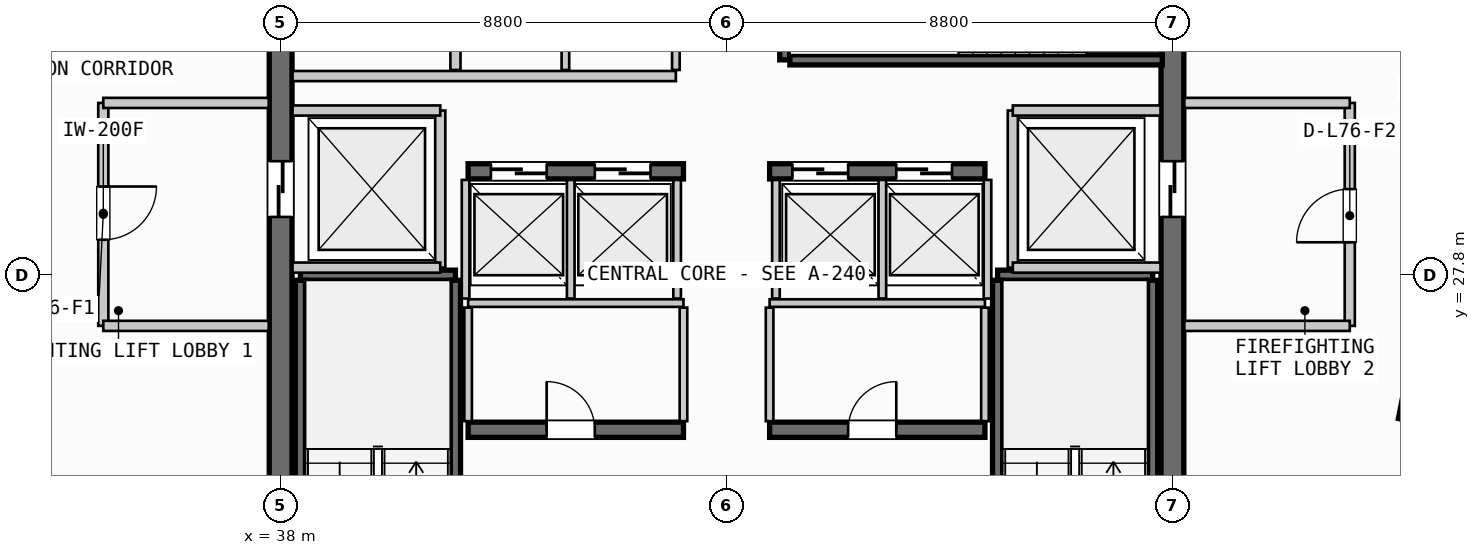
"""IFC4 building model, lengths in metres.
Left out: names, types, materials, properties, quantities, classifications, styles, units other than length and angle.
Written with IfcOpenShell. Run it as: python <this file> out.ifc"""

import sys

from ifc_helpers import new_model, si_unit, direction, frame, frame_2d, origin, origin_2d, place, context, subcontext, project, spatial, rectangle, i_section, extrude, source, transform, mapped, element, fill, save


model = new_model("IFC4")
c1 = context("Model", 3, precision=1e-05, world=origin(), true_north=direction((0.0, 1.0)))
c2 = subcontext(c1, "Body", "Model", "MODEL_VIEW")
j1 = project(units=[si_unit("LENGTHUNIT", "METRE"), si_unit("PLANEANGLEUNIT", "RADIAN")], contexts=[c1])
p1 = place(None, origin())
s1 = spatial("IfcSite", under=j1, at=p1, CompositionType="ELEMENT")
p2 = place(p1, origin())
s2 = spatial("IfcBuilding", under=s1, at=p2, CompositionType="ELEMENT")
p3 = place(p2, frame((0.0, 0.0, 287.05)))
s3 = spatial("IfcBuildingStorey", under=s2, at=p3, CompositionType="ELEMENT", Elevation=287.05)
p4 = place(p3, frame((38.0, 35.26, 0.0), z_axis=(0.0, 0.0, 1.0), x_axis=(0.0, -1.0, 0.0)))
e1 = element("IfcWall", 1, at=p4, inside=s3, PredefinedType="SHEAR", context=c2, shape_type="SweptSolid", body=[
    extrude(rectangle(XDim=14.92, YDim=0.45, at=frame_2d((7.46, 0.0))), origin(), (0.0, 0.0, 1.0), 3.21),
])
p5 = place(p4, frame((5.21, 0.0, 0.0)))
e2 = element("IfcOpeningElement", 2, at=p5, cuts=e1, PredefinedType="OPENING", context=c2, shape_type="SweptSolid", body=[
    extrude(rectangle(XDim=1.1, YDim=2.2, at=frame_2d((0.55, 1.1))), frame((0.0, 0.235, 0.0), z_axis=(0.0, -1.0, 0.0), x_axis=(1.0, 0.0, 0.0)), (0.0, 0.0, 1.0), 0.47),
])
p6 = place(p3, frame((55.6, 20.34, 0.0), z_axis=(0.0, 0.0, 1.0), x_axis=(0.0, 1.0, 0.0)))
e3 = element("IfcWall", 3, at=p6, inside=s3, PredefinedType="SHEAR", context=c2, shape_type="SweptSolid", body=[
    extrude(rectangle(XDim=14.92, YDim=0.45, at=frame_2d((7.46, 0.0))), origin(), (0.0, 0.0, 1.0), 3.21),
])
p7 = place(p6, frame((12.71, 0.0, 0.0)))
e4 = element("IfcOpeningElement", 4, at=p7, cuts=e3, PredefinedType="OPENING", context=c2, shape_type="SweptSolid", body=[
    extrude(rectangle(XDim=1.05, YDim=2.15, at=frame_2d((0.525, 1.075))), frame((0.0, 0.235, 0.0), z_axis=(0.0, -1.0, 0.0), x_axis=(1.0, 0.0, 0.0)), (0.0, 0.0, 1.0), 0.47),
])
p8 = place(p6, frame((8.61, 0.0, 0.0)))
e5 = element("IfcOpeningElement", 5, at=p8, cuts=e3, PredefinedType="OPENING", context=c2, shape_type="SweptSolid", body=[
    extrude(rectangle(XDim=1.1, YDim=2.2, at=frame_2d((0.55, 1.1))), frame((0.0, 0.235, 0.0), z_axis=(0.0, -1.0, 0.0), x_axis=(1.0, 0.0, 0.0)), (0.0, 0.0, 1.0), 0.47),
])
p9 = place(p3, frame((41.7, 24.75, 0.0), z_axis=(0.0, 0.0, 1.0), x_axis=(1.0, 0.0, 0.0)))
e6 = element("IfcWall", 6, at=p9, inside=s3, PredefinedType="SHEAR", context=c2, shape_type="SweptSolid", body=[
    extrude(rectangle(XDim=4.25, YDim=0.3, at=frame_2d((2.125, 0.0))), origin(), (0.0, 0.0, 1.0), 3.21),
])
p10 = place(p9, frame((1.55, 0.0, 0.0)))
e7 = element("IfcOpeningElement", 7, at=p10, cuts=e6, PredefinedType="OPENING", context=c2, shape_type="SweptSolid", body=[
    extrude(rectangle(XDim=0.95, YDim=2.15, at=frame_2d((0.475, 1.075))), frame((0.0, 0.16, 0.0), z_axis=(0.0, -1.0, 0.0), x_axis=(1.0, 0.0, 0.0)), (0.0, 0.0, 1.0), 0.32),
])
p11 = place(p3, frame((47.65, 24.75, 0.0), z_axis=(0.0, 0.0, 1.0), x_axis=(1.0, 0.0, 0.0)))
e8 = element("IfcWall", 8, at=p11, inside=s3, PredefinedType="SHEAR", context=c2, shape_type="SweptSolid", body=[
    extrude(rectangle(XDim=4.25, YDim=0.3, at=frame_2d((2.125, 0.0))), origin(), (0.0, 0.0, 1.0), 3.21),
])
p12 = place(p11, frame((1.55, 0.0, 0.0)))
e9 = element("IfcOpeningElement", 9, at=p12, cuts=e8, PredefinedType="OPENING", context=c2, shape_type="SweptSolid", body=[
    extrude(rectangle(XDim=0.95, YDim=2.15, at=frame_2d((0.475, 1.075))), frame((0.0, 0.16, 0.0), z_axis=(0.0, -1.0, 0.0), x_axis=(1.0, 0.0, 0.0)), (0.0, 0.0, 1.0), 0.32),
])
p13 = place(p3, frame((41.7, 29.85, 0.0), z_axis=(0.0, 0.0, 1.0), x_axis=(1.0, 0.0, 0.0)))
e10 = element("IfcWall", 10, at=p13, inside=s3, PredefinedType="SHEAR", context=c2, shape_type="SweptSolid", body=[
    extrude(rectangle(XDim=4.25, YDim=0.3, at=frame_2d((2.125, 0.0))), origin(), (0.0, 0.0, 1.0), 3.21),
])
p14 = place(p13, frame((0.45, 0.0, 0.0)))
e11 = element("IfcOpeningElement", 11, at=p14, cuts=e10, PredefinedType="OPENING", context=c2, shape_type="SweptSolid", body=[
    extrude(rectangle(XDim=1.1, YDim=2.2, at=frame_2d((0.55, 1.1))), frame((0.0, 0.16, 0.0), z_axis=(0.0, -1.0, 0.0), x_axis=(1.0, 0.0, 0.0)), (0.0, 0.0, 1.0), 0.32),
])
p15 = place(p13, frame((2.5, 0.0, 0.0)))
e12 = element("IfcOpeningElement", 12, at=p15, cuts=e10, PredefinedType="OPENING", context=c2, shape_type="SweptSolid", body=[
    extrude(rectangle(XDim=1.1, YDim=2.2, at=frame_2d((0.55, 1.1))), frame((0.0, 0.16, 0.0), z_axis=(0.0, -1.0, 0.0), x_axis=(1.0, 0.0, 0.0)), (0.0, 0.0, 1.0), 0.32),
])
p16 = place(p3, frame((47.65, 29.85, 0.0), z_axis=(0.0, 0.0, 1.0), x_axis=(1.0, 0.0, 0.0)))
e13 = element("IfcWall", 13, at=p16, inside=s3, PredefinedType="SHEAR", context=c2, shape_type="SweptSolid", body=[
    extrude(rectangle(XDim=4.25, YDim=0.3, at=frame_2d((2.125, 0.0))), origin(), (0.0, 0.0, 1.0), 3.21),
])
p17 = place(p16, frame((0.45, 0.0, 0.0)))
e14 = element("IfcOpeningElement", 14, at=p17, cuts=e13, PredefinedType="OPENING", context=c2, shape_type="SweptSolid", body=[
    extrude(rectangle(XDim=1.1, YDim=2.2, at=frame_2d((0.55, 1.1))), frame((0.0, 0.16, 0.0), z_axis=(0.0, -1.0, 0.0), x_axis=(1.0, 0.0, 0.0)), (0.0, 0.0, 1.0), 0.32),
])
p18 = place(p16, frame((2.5, 0.0, 0.0)))
e15 = element("IfcOpeningElement", 15, at=p18, cuts=e13, PredefinedType="OPENING", context=c2, shape_type="SweptSolid", body=[
    extrude(rectangle(XDim=1.1, YDim=2.2, at=frame_2d((0.55, 1.1))), frame((0.0, 0.16, 0.0), z_axis=(0.0, -1.0, 0.0), x_axis=(1.0, 0.0, 0.0)), (0.0, 0.0, 1.0), 0.32),
])
m1 = source(origin(), c2, "Body", "SweptSolid", [
    extrude(i_section(OverallWidth=0.374, OverallDepth=0.383, WebThickness=0.017, FlangeThickness=0.026, FilletRadius=0.015, at=origin_2d()), origin(), (0.0, 0.0, 1.0), 3.21),
])
p19 = place(p3, frame((60.284, 25.118, 0.0), z_axis=(0.0, 0.0, 1.0), x_axis=(0.980785280403, -0.195090322016, 0.0)))
e16 = element("IfcColumn", 16, at=p19, inside=s3, PredefinedType="COLUMN", context=c2, shape_type="MappedRepresentation", body=[
    mapped(m1, transform((0.0, 0.0, 0.0), scale=1.0)),
])
p20 = place(p3, frame((38.39, 27.8, 0.0), z_axis=(0.0, 0.0, 1.0), x_axis=(1.0, 0.0, 0.0)))
e17 = element("IfcWall", 17, at=p20, inside=s3, PredefinedType="SHEAR", context=c2, shape_type="SweptSolid", body=[
    extrude(rectangle(XDim=3.06, YDim=0.2, at=frame_2d((1.53, 0.0))), origin(), (0.0, 0.0, 1.0), 3.21),
])
for number, where, z_axis, x_axis in (
    (18, (41.45, 27.7, 0.0), (0.0, 0.0, 1.0), (0.0, -1.0, 0.0)),
    (19, (38.39, 20.35, 0.0), (0.0, 0.0, 1.0), (0.0, 1.0, 0.0)),
):
    element("IfcWall", number, at=place(p3, frame(where, z_axis=z_axis, x_axis=x_axis)), inside=s3, PredefinedType="SHEAR", context=c2, shape_type="SweptSolid", body=[
        extrude(rectangle(XDim=7.35, YDim=0.2, at=frame_2d((3.675, 0.0))), origin(), (0.0, 0.0, 1.0), 3.21),
    ])
p21 = place(p3, frame((52.15, 27.8, 0.0), z_axis=(0.0, 0.0, 1.0), x_axis=(1.0, 0.0, 0.0)))
e20 = element("IfcWall", 20, at=p21, inside=s3, PredefinedType="SHEAR", context=c2, shape_type="SweptSolid", body=[
    extrude(rectangle(XDim=3.06, YDim=0.2, at=frame_2d((1.53, 0.0))), origin(), (0.0, 0.0, 1.0), 3.21),
])
for number, where, z_axis, x_axis in (
    (21, (55.21, 27.7, 0.0), (0.0, 0.0, 1.0), (0.0, -1.0, 0.0)),
    (22, (52.15, 20.35, 0.0), (0.0, 0.0, 1.0), (0.0, 1.0, 0.0)),
):
    element("IfcWall", number, at=place(p3, frame(where, z_axis=z_axis, x_axis=x_axis)), inside=s3, PredefinedType="SHEAR", context=c2, shape_type="SweptSolid", body=[
        extrude(rectangle(XDim=7.35, YDim=0.2, at=frame_2d((3.675, 0.0))), origin(), (0.0, 0.0, 1.0), 3.21),
    ])
p22 = place(p3, frame((47.95, 32.05, 0.0), z_axis=(0.0, 0.0, 1.0), x_axis=(0.0, 1.0, 0.0)))
e23 = element("IfcWall", 23, at=p22, inside=s3, PredefinedType="SHEAR", context=c2, shape_type="SweptSolid", body=[
    extrude(rectangle(XDim=3.06, YDim=0.2, at=frame_2d((1.53, 0.0))), origin(), (0.0, 0.0, 1.0), 3.21),
])
p23 = place(p3, frame((55.4, 32.05, 0.0), z_axis=(0.0, 0.0, 1.0), x_axis=(-1.0, 0.0, 0.0)))
e24 = element("IfcWall", 24, at=p23, inside=s3, PredefinedType="SHEAR", context=c2, shape_type="SweptSolid", body=[
    extrude(rectangle(XDim=7.35, YDim=0.2, at=frame_2d((3.675, 0.0))), origin(), (0.0, 0.0, 1.0), 3.21),
])
p24 = place(p3, frame((41.15, 27.95, 0.0), z_axis=(0.0, 0.0, 1.0), x_axis=(0.0, 1.0, 0.0)))
e25 = element("IfcWall", 25, at=p24, inside=s3, PredefinedType="PARTITIONING", context=c2, shape_type="SweptSolid", body=[
    extrude(rectangle(XDim=3.1, YDim=0.2, at=frame_2d((1.55, 0.0))), origin(), (0.0, 0.0, 1.0), 2.315),
])
for number, where, z_axis, x_axis in (
    (26, (38.235, 27.95, 0.0), (0.0, 0.0, 1.0), (1.0, 0.0, 0.0)),
    (27, (38.235, 31.05, 0.0), (0.0, 0.0, 1.0), (1.0, 0.0, 0.0)),
):
    element("IfcWall", number, at=place(p3, frame(where, z_axis=z_axis, x_axis=x_axis)), inside=s3, PredefinedType="PARTITIONING", context=c2, shape_type="SweptSolid", body=[
        extrude(rectangle(XDim=2.915, YDim=0.2, at=frame_2d((1.458, 0.0))), origin(), (0.0, 0.0, 1.0), 2.315),
    ])
p25 = place(p3, frame((34.5, 31.2, 0.0), z_axis=(0.0, 0.0, 1.0), x_axis=(0.0, -1.0, 0.0)))
e28 = element("IfcWall", 28, at=p25, inside=s3, PredefinedType="PARTITIONING", context=c2, shape_type="SweptSolid", body=[
    extrude(rectangle(XDim=4.4, YDim=0.2, at=frame_2d((2.2, 0.0))), origin(), (0.0, 0.0, 1.0), 2.315),
])
p26 = place(p25, frame((1.65, 0.0, 0.0)))
e29 = element("IfcOpeningElement", 29, at=p26, cuts=e28, PredefinedType="OPENING", context=c2, shape_type="SweptSolid", body=[
    extrude(rectangle(XDim=1.05, YDim=2.15, at=frame_2d((0.525, 1.075))), frame((0.0, 0.11, 0.0), z_axis=(0.0, -1.0, 0.0), x_axis=(1.0, 0.0, 0.0)), (0.0, 0.0, 1.0), 0.22),
])
for number, where, z_axis, x_axis in (
    (30, (34.5, 26.8, 0.0), (0.0, 0.0, 1.0), (1.0, 0.0, 0.0)),
    (31, (34.5, 31.2, 0.0), (0.0, 0.0, 1.0), (1.0, 0.0, 0.0)),
):
    element("IfcWall", number, at=place(p3, frame(where, z_axis=z_axis, x_axis=x_axis)), inside=s3, PredefinedType="PARTITIONING", context=c2, shape_type="SweptSolid", body=[
        extrude(rectangle(XDim=3.265, YDim=0.2, at=frame_2d((1.632, 0.0))), origin(), (0.0, 0.0, 1.0), 2.315),
    ])
p27 = place(p3, frame((52.45, 27.95, 0.0), z_axis=(0.0, 0.0, 1.0), x_axis=(0.0, 1.0, 0.0)))
e32 = element("IfcWall", 32, at=p27, inside=s3, PredefinedType="PARTITIONING", context=c2, shape_type="SweptSolid", body=[
    extrude(rectangle(XDim=3.1, YDim=0.2, at=frame_2d((1.55, 0.0))), origin(), (0.0, 0.0, 1.0), 2.315),
])
for number, where, z_axis, x_axis in (
    (33, (52.45, 27.95, 0.0), (0.0, 0.0, 1.0), (1.0, 0.0, 0.0)),
    (34, (52.45, 31.05, 0.0), (0.0, 0.0, 1.0), (1.0, 0.0, 0.0)),
):
    element("IfcWall", number, at=place(p3, frame(where, z_axis=z_axis, x_axis=x_axis)), inside=s3, PredefinedType="PARTITIONING", context=c2, shape_type="SweptSolid", body=[
        extrude(rectangle(XDim=2.915, YDim=0.2, at=frame_2d((1.458, 0.0))), origin(), (0.0, 0.0, 1.0), 2.315),
    ])
p28 = place(p3, frame((59.1, 26.8, 0.0), z_axis=(0.0, 0.0, 1.0), x_axis=(0.0, 1.0, 0.0)))
e35 = element("IfcWall", 35, at=p28, inside=s3, PredefinedType="PARTITIONING", context=c2, shape_type="SweptSolid", body=[
    extrude(rectangle(XDim=4.4, YDim=0.2, at=frame_2d((2.2, 0.0))), origin(), (0.0, 0.0, 1.0), 2.315),
])
p29 = place(p28, frame((1.65, 0.0, 0.0)))
e36 = element("IfcOpeningElement", 36, at=p29, cuts=e35, PredefinedType="OPENING", context=c2, shape_type="SweptSolid", body=[
    extrude(rectangle(XDim=1.05, YDim=2.15, at=frame_2d((0.525, 1.075))), frame((0.0, 0.11, 0.0), z_axis=(0.0, -1.0, 0.0), x_axis=(1.0, 0.0, 0.0)), (0.0, 0.0, 1.0), 0.22),
])
for number, where, z_axis, x_axis in (
    (37, (55.835, 26.8, 0.0), (0.0, 0.0, 1.0), (1.0, 0.0, 0.0)),
    (38, (55.835, 31.2, 0.0), (0.0, 0.0, 1.0), (1.0, 0.0, 0.0)),
):
    element("IfcWall", number, at=place(p3, frame(where, z_axis=z_axis, x_axis=x_axis)), inside=s3, PredefinedType="PARTITIONING", context=c2, shape_type="SweptSolid", body=[
        extrude(rectangle(XDim=3.265, YDim=0.2, at=frame_2d((1.633, 0.0))), origin(), (0.0, 0.0, 1.0), 2.315),
    ])
for number, where, z_axis, x_axis in (
    (39, (41.7, 27.25, 0.0), (0.0, 0.0, 1.0), (1.0, 0.0, 0.0)),
    (40, (47.65, 27.25, 0.0), (0.0, 0.0, 1.0), (1.0, 0.0, 0.0)),
):
    element("IfcWall", number, at=place(p3, frame(where, z_axis=z_axis, x_axis=x_axis)), inside=s3, PredefinedType="PARTITIONING", context=c2, shape_type="SweptSolid", body=[
        extrude(rectangle(XDim=4.25, YDim=0.15, at=frame_2d((2.125, 0.0))), origin(), (0.0, 0.0, 1.0), 2.315),
    ])
for number, where, z_axis, x_axis in (
    (41, (41.7, 24.92, 0.0), (0.0, 0.0, 1.0), (0.0, 1.0, 0.0)),
    (42, (45.95, 24.92, 0.0), (0.0, 0.0, 1.0), (0.0, 1.0, 0.0)),
    (43, (47.65, 24.92, 0.0), (0.0, 0.0, 1.0), (0.0, 1.0, 0.0)),
    (44, (51.9, 24.92, 0.0), (0.0, 0.0, 1.0), (0.0, 1.0, 0.0)),
):
    element("IfcWall", number, at=place(p3, frame(where, z_axis=z_axis, x_axis=x_axis)), inside=s3, PredefinedType="PARTITIONING", context=c2, shape_type="SweptSolid", body=[
        extrude(rectangle(XDim=2.24, YDim=0.15, at=frame_2d((1.12, 0.0))), origin(), (0.0, 0.0, 1.0), 2.315),
    ])
for number, where, z_axis, x_axis in (
    (45, (41.65, 27.34, 0.0), (0.0, 0.0, 1.0), (0.0, 1.0, 0.0)),
    (46, (43.725, 27.34, 0.0), (0.0, 0.0, 1.0), (0.0, 1.0, 0.0)),
    (47, (45.825, 27.34, 0.0), (0.0, 0.0, 1.0), (0.0, 1.0, 0.0)),
    (48, (47.775, 27.34, 0.0), (0.0, 0.0, 1.0), (0.0, 1.0, 0.0)),
    (49, (49.875, 27.34, 0.0), (0.0, 0.0, 1.0), (0.0, 1.0, 0.0)),
    (50, (51.95, 27.34, 0.0), (0.0, 0.0, 1.0), (0.0, 1.0, 0.0)),
):
    element("IfcWall", number, at=place(p3, frame(where, z_axis=z_axis, x_axis=x_axis)), inside=s3, PredefinedType="PARTITIONING", context=c2, shape_type="SweptSolid", body=[
        extrude(rectangle(XDim=2.34, YDim=0.15, at=frame_2d((1.17, 0.0))), origin(), (0.0, 0.0, 1.0), 2.315),
    ])
p30 = place(p3, frame((41.45, 31.85, 0.0), z_axis=(0.0, 0.0, 1.0), x_axis=(0.0, 1.0, 0.0)))
e51 = element("IfcWall", 51, at=p30, inside=s3, PredefinedType="PARTITIONING", context=c2, shape_type="SweptSolid", body=[
    extrude(rectangle(XDim=3.415, YDim=0.2, at=frame_2d((1.708, 0.0))), origin(), (0.0, 0.0, 1.0), 2.315),
])
p31 = place(p3, frame((38.235, 31.73, 0.0), z_axis=(0.0, 0.0, 1.0), x_axis=(1.0, 0.0, 0.0)))
e52 = element("IfcWall", 52, at=p31, inside=s3, PredefinedType="PARTITIONING", context=c2, shape_type="SweptSolid", body=[
    extrude(rectangle(XDim=7.565, YDim=0.2, at=frame_2d((3.782, 0.0))), origin(), (0.0, 0.0, 1.0), 2.315),
])
p32 = place(p3, frame((45.8, 31.85, 0.0), z_axis=(0.0, 0.0, 1.0), x_axis=(0.0, 1.0, 0.0)))
e53 = element("IfcWall", 53, at=p32, inside=s3, PredefinedType="PARTITIONING", context=c2, shape_type="SweptSolid", body=[
    extrude(rectangle(XDim=3.415, YDim=0.15, at=frame_2d((1.708, 0.0))), origin(), (0.0, 0.0, 1.0), 2.315),
])
p33 = place(p3, frame((43.62, 31.85, 0.0), z_axis=(0.0, 0.0, 1.0), x_axis=(0.0, 1.0, 0.0)))
e54 = element("IfcWall", 54, at=p33, inside=s3, PredefinedType="PLUMBINGWALL", context=c2, shape_type="SweptSolid", body=[
    extrude(rectangle(XDim=3.415, YDim=0.15, at=frame_2d((1.708, 0.0))), origin(), (0.0, 0.0, 1.0), 2.315),
])
m2 = source(origin(), c2, "Body", "SweptSolid", [
    extrude(rectangle(XDim=1.1, YDim=2.2, at=frame_2d((0.55, 1.1))), frame((0.0, 0.025, 0.0), z_axis=(0.0, -1.0, 0.0), x_axis=(1.0, 0.0, 0.0)), (0.0, 0.0, 1.0), 0.05),
])
p34 = place(p5, origin())
e55 = element("IfcDoor", 55, at=p34, inside=s3, OperationType="SLIDING_TO_LEFT", PredefinedType="DOOR", context=c2, shape_type="MappedRepresentation", body=[
    mapped(m2, transform((0.0, 0.0, 0.0), scale=1.0)),
])
fill(e2, e55)
p35 = place(p8, origin())
e56 = element("IfcDoor", 56, at=p35, inside=s3, OperationType="SLIDING_TO_RIGHT", PredefinedType="DOOR", context=c2, shape_type="MappedRepresentation", body=[
    mapped(m2, transform((0.0, 0.0, 0.0), scale=1.0)),
])
fill(e5, e56)
m3 = source(origin(), c2, "Body", "SweptSolid", [
    extrude(rectangle(XDim=0.95, YDim=2.15, at=frame_2d((0.475, 1.075))), frame((0.0, 0.025, 0.0), z_axis=(0.0, -1.0, 0.0), x_axis=(1.0, 0.0, 0.0)), (0.0, 0.0, 1.0), 0.05),
])
p36 = place(p10, origin())
e57 = element("IfcDoor", 57, at=p36, inside=s3, OperationType="SINGLE_SWING_LEFT", PredefinedType="DOOR", context=c2, shape_type="MappedRepresentation", body=[
    mapped(m3, transform((0.0, 0.0, 0.0), scale=1.0)),
])
fill(e7, e57)
p37 = place(p12, origin())
e58 = element("IfcDoor", 58, at=p37, inside=s3, OperationType="SINGLE_SWING_RIGHT", PredefinedType="DOOR", context=c2, shape_type="MappedRepresentation", body=[
    mapped(m3, transform((0.0, 0.0, 0.0), scale=1.0)),
])
fill(e9, e58)
p38 = place(p14, origin())
e59 = element("IfcDoor", 59, at=p38, inside=s3, OperationType="SLIDING_TO_LEFT", PredefinedType="DOOR", context=c2, shape_type="MappedRepresentation", body=[
    mapped(m2, transform((0.0, 0.0, 0.0), scale=1.0)),
])
fill(e11, e59)
p39 = place(p15, origin())
e60 = element("IfcDoor", 60, at=p39, inside=s3, OperationType="SLIDING_TO_LEFT", PredefinedType="DOOR", context=c2, shape_type="MappedRepresentation", body=[
    mapped(m2, transform((0.0, 0.0, 0.0), scale=1.0)),
])
fill(e12, e60)
p40 = place(p17, origin())
e61 = element("IfcDoor", 61, at=p40, inside=s3, OperationType="SLIDING_TO_LEFT", PredefinedType="DOOR", context=c2, shape_type="MappedRepresentation", body=[
    mapped(m2, transform((0.0, 0.0, 0.0), scale=1.0)),
])
fill(e14, e61)
p41 = place(p18, origin())
e62 = element("IfcDoor", 62, at=p41, inside=s3, OperationType="SLIDING_TO_LEFT", PredefinedType="DOOR", context=c2, shape_type="MappedRepresentation", body=[
    mapped(m2, transform((0.0, 0.0, 0.0), scale=1.0)),
])
fill(e15, e62)
m4 = source(origin(), c2, "Body", "SweptSolid", [
    extrude(rectangle(XDim=1.05, YDim=2.15, at=frame_2d((0.525, 1.075))), frame((0.0, 0.025, 0.0), z_axis=(0.0, -1.0, 0.0), x_axis=(1.0, 0.0, 0.0)), (0.0, 0.0, 1.0), 0.05),
])
p42 = place(p26, origin())
e63 = element("IfcDoor", 63, at=p42, inside=s3, OperationType="SINGLE_SWING_LEFT", PredefinedType="DOOR", context=c2, shape_type="MappedRepresentation", body=[
    mapped(m4, transform((0.0, 0.0, 0.0), scale=1.0)),
])
fill(e29, e63)
p43 = place(p29, origin())
e64 = element("IfcDoor", 64, at=p43, inside=s3, OperationType="SINGLE_SWING_LEFT", PredefinedType="DOOR", context=c2, shape_type="MappedRepresentation", body=[
    mapped(m4, transform((0.0, 0.0, 0.0), scale=1.0)),
])
fill(e36, e64)
save(model, sys.argv[1])
